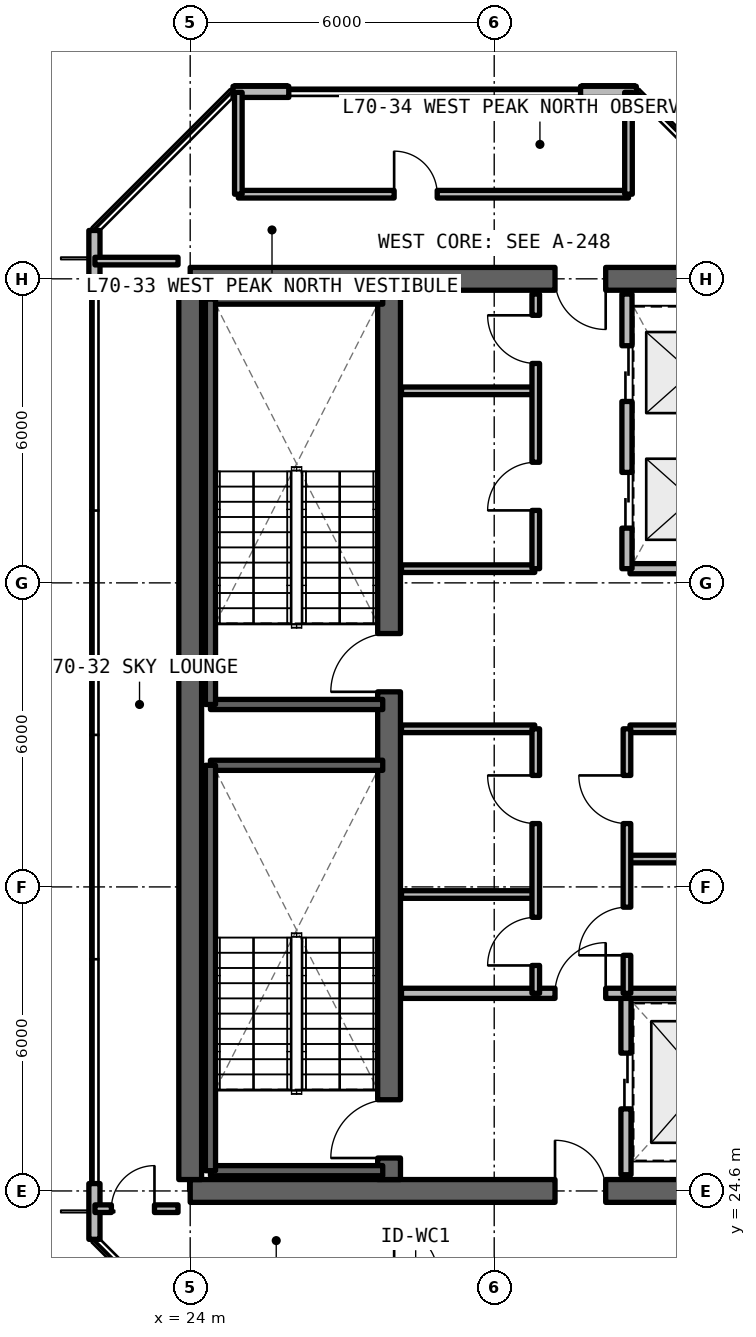
"""IFC4 building model, lengths in metres.
Left out: names, types, materials, properties, quantities, classifications, styles, units other than length and angle.
Written with IfcOpenShell. Run it as: python <this file> out.ifc"""

import sys

from ifc_helpers import new_model, si_unit, direction, frame, frame_2d, origin, place, context, subcontext, project, spatial, rectangle, extrude, element, fill, save


model = new_model("IFC4")
c1 = context("Model", 3, precision=1e-05, world=origin(), true_north=direction((0.0, 1.0)))
c2 = subcontext(c1, "Body", "Model", "MODEL_VIEW")
j1 = project(units=[si_unit("LENGTHUNIT", "METRE"), si_unit("PLANEANGLEUNIT", "RADIAN")], contexts=[c1])
p1 = place(None, origin())
s1 = spatial("IfcSite", under=j1, at=p1, CompositionType="ELEMENT")
p2 = place(p1, origin())
s2 = spatial("IfcBuilding", under=s1, at=p2, CompositionType="ELEMENT")
p3 = place(p2, frame((0.0, 0.0, 249.81)))
s3 = spatial("IfcBuildingStorey", under=s2, at=p3, CompositionType="ELEMENT", Elevation=249.81)
p4 = place(p3, frame((24.0, 24.6, 0.0), z_axis=(0.0, 0.0, 1.0), x_axis=(1.0, 0.0, 0.0)))
e1 = element("IfcWall", 1, at=p4, inside=s3, PredefinedType="SHEAR", context=c2, shape_type="SweptSolid", body=[
    extrude(rectangle(XDim=12.0, YDim=0.45, at=frame_2d((6.0, 0.0))), origin(), (0.0, 0.0, 1.0), 3.63),
])
p5 = place(p4, frame((7.2, 0.0, 0.0)))
e2 = element("IfcOpeningElement", 2, at=p5, cuts=e1, PredefinedType="OPENING", context=c2, shape_type="SweptSolid", body=[
    extrude(rectangle(XDim=1.0, YDim=2.15, at=frame_2d((0.5, 1.075))), frame((0.0, 0.235, 0.0), z_axis=(0.0, -1.0, 0.0), x_axis=(1.0, 0.0, 0.0)), (0.0, 0.0, 1.0), 0.47),
])
p6 = place(p3, frame((36.0, 42.6, 0.0), z_axis=(0.0, 0.0, 1.0), x_axis=(-1.0, 0.0, 0.0)))
e3 = element("IfcWall", 3, at=p6, inside=s3, PredefinedType="SHEAR", context=c2, shape_type="SweptSolid", body=[
    extrude(rectangle(XDim=12.0, YDim=0.45, at=frame_2d((6.0, 0.0))), origin(), (0.0, 0.0, 1.0), 3.63),
])
p7 = place(p6, frame((3.8, 0.0, 0.0)))
e4 = element("IfcOpeningElement", 4, at=p7, cuts=e3, PredefinedType="OPENING", context=c2, shape_type="SweptSolid", body=[
    extrude(rectangle(XDim=1.0, YDim=2.15, at=frame_2d((0.5, 1.075))), frame((0.0, 0.235, 0.0), z_axis=(0.0, -1.0, 0.0), x_axis=(1.0, 0.0, 0.0)), (0.0, 0.0, 1.0), 0.47),
])
p8 = place(p3, frame((24.0, 24.825, 0.0), z_axis=(0.0, 0.0, 1.0), x_axis=(0.0, 1.0, 0.0)))
e5 = element("IfcWall", 5, at=p8, inside=s3, PredefinedType="SHEAR", context=c2, shape_type="SweptSolid", body=[
    extrude(rectangle(XDim=17.55, YDim=0.45, at=frame_2d((8.775, 0.0))), origin(), (0.0, 0.0, 1.0), 3.63),
])
p9 = place(p3, frame((27.925, 24.825, 0.0), z_axis=(0.0, 0.0, 1.0), x_axis=(0.0, 1.0, 0.0)))
e6 = element("IfcWall", 6, at=p9, inside=s3, PredefinedType="SHEAR", context=c2, shape_type="SweptSolid", body=[
    extrude(rectangle(XDim=17.55, YDim=0.45, at=frame_2d((8.775, 0.0))), origin(), (0.0, 0.0, 1.0), 3.63),
])
p10 = place(p9, frame((0.425, 0.0, 0.0)))
e7 = element("IfcOpeningElement", 7, at=p10, cuts=e6, PredefinedType="OPENING", context=c2, shape_type="SweptSolid", body=[
    extrude(rectangle(XDim=1.15, YDim=2.15, at=frame_2d((0.575, 1.075))), frame((0.0, 0.235, 0.0), z_axis=(0.0, -1.0, 0.0), x_axis=(1.0, 0.0, 0.0)), (0.0, 0.0, 1.0), 0.47),
])
p11 = place(p9, frame((9.625, 0.0, 0.0)))
e8 = element("IfcOpeningElement", 8, at=p11, cuts=e6, PredefinedType="OPENING", context=c2, shape_type="SweptSolid", body=[
    extrude(rectangle(XDim=1.15, YDim=2.15, at=frame_2d((0.575, 1.075))), frame((0.0, 0.235, 0.0), z_axis=(0.0, -1.0, 0.0), x_axis=(1.0, 0.0, 0.0)), (0.0, 0.0, 1.0), 0.47),
])
p12 = place(p3, frame((32.804, 46.29, 0.0), z_axis=(0.0, 0.0, 1.0), x_axis=(-1.0, 0.0, 0.0)))
e9 = element("IfcWall", 9, at=p12, inside=s3, PredefinedType="SOLIDWALL", context=c2, shape_type="SweptSolid", body=[
    extrude(rectangle(XDim=1.1, YDim=0.22, at=frame_2d((0.55, 0.0))), origin(), (0.0, 0.0, 1.0), 3.41),
])
p13 = place(p3, frame((25.946, 46.29, 0.0), z_axis=(0.0, 0.0, 1.0), x_axis=(-1.0, 0.0, 0.0)))
e10 = element("IfcWall", 10, at=p13, inside=s3, PredefinedType="SOLIDWALL", context=c2, shape_type="SweptSolid", body=[
    extrude(rectangle(XDim=1.1, YDim=0.22, at=frame_2d((0.55, 0.0))), origin(), (0.0, 0.0, 1.0), 3.41),
])
for number, where, z_axis, x_axis in (
    (11, (22.11, 43.554, 0.0), (0.0, 0.0, 1.0), (0.0, -1.0, 0.0)),
    (12, (22.11, 24.746, 0.0), (0.0, 0.0, 1.0), (0.0, -1.0, 0.0)),
):
    element("IfcWall", number, at=place(p3, frame(where, z_axis=z_axis, x_axis=x_axis)), inside=s3, PredefinedType="SOLIDWALL", context=c2, shape_type="SweptSolid", body=[
        extrude(rectangle(XDim=1.1, YDim=0.22, at=frame_2d((0.55, 0.0))), origin(), (0.0, 0.0, 1.0), 3.41),
    ])
p14 = place(p3, frame((32.6, 24.92, 0.0), z_axis=(0.0, 0.0, 1.0), x_axis=(0.0, 1.0, 0.0)))
e13 = element("IfcWall", 13, at=p14, inside=s3, PredefinedType="SOLIDWALL", context=c2, shape_type="SweptSolid", body=[
    extrude(rectangle(XDim=3.58, YDim=0.2, at=frame_2d((1.79, 0.0))), origin(), (0.0, 0.0, 1.0), 2.63),
])
p15 = place(p14, frame((1.3, 0.0, 0.0)))
e14 = element("IfcOpeningElement", 14, at=p15, cuts=e13, PredefinedType="OPENING", context=c2, shape_type="SweptSolid", body=[
    extrude(rectangle(XDim=1.1, YDim=2.2, at=frame_2d((0.55, 1.1))), frame((0.0, 0.11, 0.0), z_axis=(0.0, -1.0, 0.0), x_axis=(1.0, 0.0, 0.0)), (0.0, 0.0, 1.0), 0.22),
])
p16 = place(p3, frame((28.17, 28.5, 0.0), z_axis=(0.0, 0.0, 1.0), x_axis=(1.0, 0.0, 0.0)))
e15 = element("IfcWall", 15, at=p16, inside=s3, PredefinedType="SOLIDWALL", context=c2, shape_type="SweptSolid", body=[
    extrude(rectangle(XDim=7.585, YDim=0.2, at=frame_2d((3.792, 0.0))), origin(), (0.0, 0.0, 1.0), 2.63),
])
p17 = place(p16, frame((3.03, 0.0, 0.0)))
e16 = element("IfcOpeningElement", 16, at=p17, cuts=e15, PredefinedType="OPENING", context=c2, shape_type="SweptSolid", body=[
    extrude(rectangle(XDim=1.0, YDim=2.15, at=frame_2d((0.5, 1.075))), frame((0.0, 0.11, 0.0), z_axis=(0.0, -1.0, 0.0), x_axis=(1.0, 0.0, 0.0)), (0.0, 0.0, 1.0), 0.22),
])
for number, where, z_axis, x_axis in (
    (17, (28.17, 30.45, 0.0), (0.0, 0.0, 1.0), (1.0, 0.0, 0.0)),
    (18, (28.17, 33.72, 0.0), (0.0, 0.0, 1.0), (1.0, 0.0, 0.0)),
):
    element("IfcWall", number, at=place(p3, frame(where, z_axis=z_axis, x_axis=x_axis)), inside=s3, PredefinedType="SOLIDWALL", context=c2, shape_type="SweptSolid", body=[
        extrude(rectangle(XDim=2.63, YDim=0.15, at=frame_2d((1.315, 0.0))), origin(), (0.0, 0.0, 1.0), 2.63),
    ])
p18 = place(p3, frame((30.82, 28.5, 0.0), z_axis=(0.0, 0.0, 1.0), x_axis=(0.0, 1.0, 0.0)))
e19 = element("IfcWall", 19, at=p18, inside=s3, PredefinedType="SOLIDWALL", context=c2, shape_type="SweptSolid", body=[
    extrude(rectangle(XDim=5.22, YDim=0.15, at=frame_2d((2.61, 0.0))), origin(), (0.0, 0.0, 1.0), 2.63),
])
p19 = place(p18, frame((0.55, 0.0, 0.0)))
e20 = element("IfcOpeningElement", 20, at=p19, cuts=e19, PredefinedType="OPENING", context=c2, shape_type="SweptSolid", body=[
    extrude(rectangle(XDim=0.95, YDim=2.15, at=frame_2d((0.475, 1.075))), frame((0.0, 0.085, 0.0), z_axis=(0.0, -1.0, 0.0), x_axis=(1.0, 0.0, 0.0)), (0.0, 0.0, 1.0), 0.17),
])
p20 = place(p18, frame((3.35, 0.0, 0.0)))
e21 = element("IfcOpeningElement", 21, at=p20, cuts=e19, PredefinedType="OPENING", context=c2, shape_type="SweptSolid", body=[
    extrude(rectangle(XDim=0.95, YDim=2.15, at=frame_2d((0.475, 1.075))), frame((0.0, 0.085, 0.0), z_axis=(0.0, -1.0, 0.0), x_axis=(1.0, 0.0, 0.0)), (0.0, 0.0, 1.0), 0.17),
])
for number, where, z_axis, x_axis in (
    (22, (32.68, 31.15, 0.0), (0.0, 0.0, 1.0), (1.0, 0.0, 0.0)),
    (23, (32.68, 33.72, 0.0), (0.0, 0.0, 1.0), (1.0, 0.0, 0.0)),
):
    element("IfcWall", number, at=place(p3, frame(where, z_axis=z_axis, x_axis=x_axis)), inside=s3, PredefinedType="SOLIDWALL", context=c2, shape_type="SweptSolid", body=[
        extrude(rectangle(XDim=3.075, YDim=0.15, at=frame_2d((1.538, 0.0))), origin(), (0.0, 0.0, 1.0), 2.63),
    ])
p21 = place(p3, frame((32.62, 28.5, 0.0), z_axis=(0.0, 0.0, 1.0), x_axis=(0.0, 1.0, 0.0)))
e24 = element("IfcWall", 24, at=p21, inside=s3, PredefinedType="SOLIDWALL", context=c2, shape_type="SweptSolid", body=[
    extrude(rectangle(XDim=5.22, YDim=0.15, at=frame_2d((2.61, 0.0))), origin(), (0.0, 0.0, 1.0), 2.63),
])
p22 = place(p21, frame((0.75, 0.0, 0.0)))
e25 = element("IfcOpeningElement", 25, at=p22, cuts=e24, PredefinedType="OPENING", context=c2, shape_type="SweptSolid", body=[
    extrude(rectangle(XDim=0.95, YDim=2.15, at=frame_2d((0.475, 1.075))), frame((0.0, 0.085, 0.0), z_axis=(0.0, -1.0, 0.0), x_axis=(1.0, 0.0, 0.0)), (0.0, 0.0, 1.0), 0.17),
])
p23 = place(p21, frame((3.35, 0.0, 0.0)))
e26 = element("IfcOpeningElement", 26, at=p23, cuts=e24, PredefinedType="OPENING", context=c2, shape_type="SweptSolid", body=[
    extrude(rectangle(XDim=0.95, YDim=2.15, at=frame_2d((0.475, 1.075))), frame((0.0, 0.085, 0.0), z_axis=(0.0, -1.0, 0.0), x_axis=(1.0, 0.0, 0.0)), (0.0, 0.0, 1.0), 0.17),
])
for number, where, z_axis, x_axis in (
    (27, (28.17, 36.88, 0.0), (0.0, 0.0, 1.0), (1.0, 0.0, 0.0)),
    (28, (28.17, 40.39, 0.0), (0.0, 0.0, 1.0), (1.0, 0.0, 0.0)),
):
    element("IfcWall", number, at=place(p3, frame(where, z_axis=z_axis, x_axis=x_axis)), inside=s3, PredefinedType="SOLIDWALL", context=c2, shape_type="SweptSolid", body=[
        extrude(rectangle(XDim=2.63, YDim=0.15, at=frame_2d((1.315, 0.0))), origin(), (0.0, 0.0, 1.0), 2.63),
    ])
p24 = place(p3, frame((30.82, 36.88, 0.0), z_axis=(0.0, 0.0, 1.0), x_axis=(0.0, 1.0, 0.0)))
e29 = element("IfcWall", 29, at=p24, inside=s3, PredefinedType="SOLIDWALL", context=c2, shape_type="SweptSolid", body=[
    extrude(rectangle(XDim=5.42, YDim=0.15, at=frame_2d((2.71, 0.0))), origin(), (0.0, 0.0, 1.0), 2.63),
])
p25 = place(p24, frame((1.15, 0.0, 0.0)))
e30 = element("IfcOpeningElement", 30, at=p25, cuts=e29, PredefinedType="OPENING", context=c2, shape_type="SweptSolid", body=[
    extrude(rectangle(XDim=0.95, YDim=2.15, at=frame_2d((0.475, 1.075))), frame((0.0, 0.085, 0.0), z_axis=(0.0, -1.0, 0.0), x_axis=(1.0, 0.0, 0.0)), (0.0, 0.0, 1.0), 0.17),
])
p26 = place(p24, frame((4.05, 0.0, 0.0)))
e31 = element("IfcOpeningElement", 31, at=p26, cuts=e29, PredefinedType="OPENING", context=c2, shape_type="SweptSolid", body=[
    extrude(rectangle(XDim=0.95, YDim=2.15, at=frame_2d((0.475, 1.075))), frame((0.0, 0.085, 0.0), z_axis=(0.0, -1.0, 0.0), x_axis=(1.0, 0.0, 0.0)), (0.0, 0.0, 1.0), 0.17),
])
p27 = place(p3, frame((32.68, 36.88, 0.0), z_axis=(0.0, 0.0, 1.0), x_axis=(1.0, 0.0, 0.0)))
e32 = element("IfcWall", 32, at=p27, inside=s3, PredefinedType="SOLIDWALL", context=c2, shape_type="SweptSolid", body=[
    extrude(rectangle(XDim=3.075, YDim=0.2, at=frame_2d((1.538, 0.0))), origin(), (0.0, 0.0, 1.0), 2.63),
])
p28 = place(p3, frame((32.62, 36.88, 0.0), z_axis=(0.0, 0.0, 1.0), x_axis=(0.0, 1.0, 0.0)))
e33 = element("IfcWall", 33, at=p28, inside=s3, PredefinedType="SOLIDWALL", context=c2, shape_type="SweptSolid", body=[
    extrude(rectangle(XDim=5.42, YDim=0.2, at=frame_2d((2.71, 0.0))), origin(), (0.0, 0.0, 1.0), 2.63),
])
p29 = place(p28, frame((0.8, 0.0, 0.0)))
e34 = element("IfcOpeningElement", 34, at=p29, cuts=e33, PredefinedType="OPENING", context=c2, shape_type="SweptSolid", body=[
    extrude(rectangle(XDim=1.1, YDim=2.2, at=frame_2d((0.55, 1.1))), frame((0.0, 0.11, 0.0), z_axis=(0.0, -1.0, 0.0), x_axis=(1.0, 0.0, 0.0)), (0.0, 0.0, 1.0), 0.22),
])
p30 = place(p28, frame((3.3, 0.0, 0.0)))
e35 = element("IfcOpeningElement", 35, at=p30, cuts=e33, PredefinedType="OPENING", context=c2, shape_type="SweptSolid", body=[
    extrude(rectangle(XDim=1.1, YDim=2.2, at=frame_2d((0.55, 1.1))), frame((0.0, 0.11, 0.0), z_axis=(0.0, -1.0, 0.0), x_axis=(1.0, 0.0, 0.0)), (0.0, 0.0, 1.0), 0.22),
])
p31 = place(p3, frame((22.12, 24.25, 0.0), z_axis=(0.0, 0.0, 1.0), x_axis=(1.0, 0.0, 0.0)))
e36 = element("IfcWall", 36, at=p31, inside=s3, PredefinedType="SOLIDWALL", context=c2, shape_type="SweptSolid", body=[
    extrude(rectangle(XDim=1.64, YDim=0.15, at=frame_2d((0.82, 0.0))), origin(), (0.0, 0.0, 1.0), 2.63),
])
p32 = place(p31, frame((0.325, 0.0, 0.0)))
e37 = element("IfcOpeningElement", 37, at=p32, cuts=e36, PredefinedType="OPENING", context=c2, shape_type="SweptSolid", body=[
    extrude(rectangle(XDim=0.85, YDim=2.1, at=frame_2d((0.425, 1.05))), frame((0.0, 0.085, 0.0), z_axis=(0.0, -1.0, 0.0), x_axis=(1.0, 0.0, 0.0)), (0.0, 0.0, 1.0), 0.17),
])
p33 = place(p3, frame((22.12, 42.95, 0.0), z_axis=(0.0, 0.0, 1.0), x_axis=(1.0, 0.0, 0.0)))
e38 = element("IfcWall", 38, at=p33, inside=s3, PredefinedType="SOLIDWALL", context=c2, shape_type="SweptSolid", body=[
    extrude(rectangle(XDim=1.64, YDim=0.15, at=frame_2d((0.82, 0.0))), origin(), (0.0, 0.0, 1.0), 2.63),
])
p34 = place(p3, frame((24.95, 44.27, 0.0), z_axis=(0.0, 0.0, 1.0), x_axis=(1.0, 0.0, 0.0)))
e39 = element("IfcWall", 39, at=p34, inside=s3, PredefinedType="SOLIDWALL", context=c2, shape_type="SweptSolid", body=[
    extrude(rectangle(XDim=7.7, YDim=0.15, at=frame_2d((3.85, 0.0))), origin(), (0.0, 0.0, 1.0), 2.63),
])
p35 = place(p34, frame((3.075, 0.0, 0.0)))
e40 = element("IfcOpeningElement", 40, at=p35, cuts=e39, PredefinedType="OPENING", context=c2, shape_type="SweptSolid", body=[
    extrude(rectangle(XDim=0.85, YDim=2.1, at=frame_2d((0.425, 1.05))), frame((0.0, 0.085, 0.0), z_axis=(0.0, -1.0, 0.0), x_axis=(1.0, 0.0, 0.0)), (0.0, 0.0, 1.0), 0.17),
])
for number, where, z_axis, x_axis in (
    (41, (24.95, 44.27, 0.0), (0.0, 0.0, 1.0), (0.0, 1.0, 0.0)),
    (42, (32.65, 44.27, 0.0), (0.0, 0.0, 1.0), (0.0, 1.0, 0.0)),
):
    element("IfcWall", number, at=place(p3, frame(where, z_axis=z_axis, x_axis=x_axis)), inside=s3, PredefinedType="SOLIDWALL", context=c2, shape_type="SweptSolid", body=[
        extrude(rectangle(XDim=2.01, YDim=0.15, at=frame_2d((1.005, 0.0))), origin(), (0.0, 0.0, 1.0), 2.63),
    ])
for number, where, z_axis, x_axis in (
    (43, (24.4, 25.0, 0.0), (0.0, 0.0, 1.0), (1.0, 0.0, 0.0)),
    (44, (27.8, 33.0, 0.0), (0.0, 0.0, 1.0), (-1.0, 0.0, 0.0)),
):
    element("IfcWall", number, at=place(p3, frame(where, z_axis=z_axis, x_axis=x_axis)), inside=s3, PredefinedType="SOLIDWALL", context=c2, shape_type="SweptSolid", body=[
        extrude(rectangle(XDim=3.4, YDim=0.2, at=frame_2d((1.7, 0.0))), origin(), (0.0, 0.0, 1.0), 3.63),
    ])
p36 = place(p3, frame((24.4, 33.0, 0.0), z_axis=(0.0, 0.0, 1.0), x_axis=(0.0, -1.0, 0.0)))
e45 = element("IfcWall", 45, at=p36, inside=s3, PredefinedType="SOLIDWALL", context=c2, shape_type="SweptSolid", body=[
    extrude(rectangle(XDim=8.0, YDim=0.2, at=frame_2d((4.0, 0.0))), origin(), (0.0, 0.0, 1.0), 3.63),
])
for number, where, z_axis, x_axis in (
    (46, (24.4, 34.2, 0.0), (0.0, 0.0, 1.0), (1.0, 0.0, 0.0)),
    (47, (27.8, 42.2, 0.0), (0.0, 0.0, 1.0), (-1.0, 0.0, 0.0)),
):
    element("IfcWall", number, at=place(p3, frame(where, z_axis=z_axis, x_axis=x_axis)), inside=s3, PredefinedType="SOLIDWALL", context=c2, shape_type="SweptSolid", body=[
        extrude(rectangle(XDim=3.4, YDim=0.2, at=frame_2d((1.7, 0.0))), origin(), (0.0, 0.0, 1.0), 3.63),
    ])
p37 = place(p3, frame((24.4, 42.2, 0.0), z_axis=(0.0, 0.0, 1.0), x_axis=(0.0, -1.0, 0.0)))
e48 = element("IfcWall", 48, at=p37, inside=s3, PredefinedType="SOLIDWALL", context=c2, shape_type="SweptSolid", body=[
    extrude(rectangle(XDim=8.0, YDim=0.2, at=frame_2d((4.0, 0.0))), origin(), (0.0, 0.0, 1.0), 3.63),
])
p38 = place(p15, origin())
e49 = element("IfcDoor", 49, at=p38, inside=s3, OperationType="SLIDING_TO_LEFT", PredefinedType="DOOR", context=c2, shape_type="SweptSolid", body=[
    extrude(rectangle(XDim=1.1, YDim=2.2, at=frame_2d((0.55, 1.1))), frame((0.0, 0.025, 0.0), z_axis=(0.0, -1.0, 0.0), x_axis=(1.0, 0.0, 0.0)), (0.0, 0.0, 1.0), 0.05),
])
fill(e14, e49)
p39 = place(p17, origin())
e50 = element("IfcDoor", 50, at=p39, inside=s3, OperationType="SINGLE_SWING_RIGHT", PredefinedType="DOOR", context=c2, shape_type="SweptSolid", body=[
    extrude(rectangle(XDim=1.0, YDim=2.15, at=frame_2d((0.5, 1.075))), frame((0.0, 0.025, 0.0), z_axis=(0.0, -1.0, 0.0), x_axis=(1.0, 0.0, 0.0)), (0.0, 0.0, 1.0), 0.05),
])
fill(e16, e50)
p40 = place(p19, origin())
e51 = element("IfcDoor", 51, at=p40, inside=s3, OperationType="SINGLE_SWING_LEFT", PredefinedType="DOOR", context=c2, shape_type="SweptSolid", body=[
    extrude(rectangle(XDim=0.95, YDim=2.15, at=frame_2d((0.475, 1.075))), frame((0.0, 0.025, 0.0), z_axis=(0.0, -1.0, 0.0), x_axis=(1.0, 0.0, 0.0)), (0.0, 0.0, 1.0), 0.05),
])
fill(e20, e51)
p41 = place(p20, origin())
e52 = element("IfcDoor", 52, at=p41, inside=s3, OperationType="SINGLE_SWING_RIGHT", PredefinedType="DOOR", context=c2, shape_type="SweptSolid", body=[
    extrude(rectangle(XDim=0.95, YDim=2.15, at=frame_2d((0.475, 1.075))), frame((0.0, 0.025, 0.0), z_axis=(0.0, -1.0, 0.0), x_axis=(1.0, 0.0, 0.0)), (0.0, 0.0, 1.0), 0.05),
])
fill(e21, e52)
p42 = place(p22, origin())
e53 = element("IfcDoor", 53, at=p42, inside=s3, OperationType="SINGLE_SWING_LEFT", PredefinedType="DOOR", context=c2, shape_type="SweptSolid", body=[
    extrude(rectangle(XDim=0.95, YDim=2.15, at=frame_2d((0.475, 1.075))), frame((0.0, 0.025, 0.0), z_axis=(0.0, -1.0, 0.0), x_axis=(1.0, 0.0, 0.0)), (0.0, 0.0, 1.0), 0.05),
])
fill(e25, e53)
p43 = place(p23, origin())
e54 = element("IfcDoor", 54, at=p43, inside=s3, OperationType="SINGLE_SWING_RIGHT", PredefinedType="DOOR", context=c2, shape_type="SweptSolid", body=[
    extrude(rectangle(XDim=0.95, YDim=2.15, at=frame_2d((0.475, 1.075))), frame((0.0, 0.025, 0.0), z_axis=(0.0, -1.0, 0.0), x_axis=(1.0, 0.0, 0.0)), (0.0, 0.0, 1.0), 0.05),
])
fill(e26, e54)
p44 = place(p25, origin())
e55 = element("IfcDoor", 55, at=p44, inside=s3, OperationType="SINGLE_SWING_LEFT", PredefinedType="DOOR", context=c2, shape_type="SweptSolid", body=[
    extrude(rectangle(XDim=0.95, YDim=2.15, at=frame_2d((0.475, 1.075))), frame((0.0, 0.025, 0.0), z_axis=(0.0, -1.0, 0.0), x_axis=(1.0, 0.0, 0.0)), (0.0, 0.0, 1.0), 0.05),
])
fill(e30, e55)
p45 = place(p26, origin())
e56 = element("IfcDoor", 56, at=p45, inside=s3, OperationType="SINGLE_SWING_RIGHT", PredefinedType="DOOR", context=c2, shape_type="SweptSolid", body=[
    extrude(rectangle(XDim=0.95, YDim=2.15, at=frame_2d((0.475, 1.075))), frame((0.0, 0.025, 0.0), z_axis=(0.0, -1.0, 0.0), x_axis=(1.0, 0.0, 0.0)), (0.0, 0.0, 1.0), 0.05),
])
fill(e31, e56)
p46 = place(p29, origin())
e57 = element("IfcDoor", 57, at=p46, inside=s3, OperationType="SLIDING_TO_LEFT", PredefinedType="DOOR", context=c2, shape_type="SweptSolid", body=[
    extrude(rectangle(XDim=1.1, YDim=2.2, at=frame_2d((0.55, 1.1))), frame((0.0, 0.025, 0.0), z_axis=(0.0, -1.0, 0.0), x_axis=(1.0, 0.0, 0.0)), (0.0, 0.0, 1.0), 0.05),
])
fill(e34, e57)
p47 = place(p30, origin())
e58 = element("IfcDoor", 58, at=p47, inside=s3, OperationType="SLIDING_TO_RIGHT", PredefinedType="DOOR", context=c2, shape_type="SweptSolid", body=[
    extrude(rectangle(XDim=1.1, YDim=2.2, at=frame_2d((0.55, 1.1))), frame((0.0, 0.025, 0.0), z_axis=(0.0, -1.0, 0.0), x_axis=(1.0, 0.0, 0.0)), (0.0, 0.0, 1.0), 0.05),
])
fill(e35, e58)
p48 = place(p32, origin())
e59 = element("IfcDoor", 59, at=p48, inside=s3, OperationType="SINGLE_SWING_RIGHT", PredefinedType="DOOR", context=c2, shape_type="SweptSolid", body=[
    extrude(rectangle(XDim=0.85, YDim=2.1, at=frame_2d((0.425, 1.05))), frame((0.0, 0.025, 0.0), z_axis=(0.0, -1.0, 0.0), x_axis=(1.0, 0.0, 0.0)), (0.0, 0.0, 1.0), 0.05),
])
fill(e37, e59)
p49 = place(p35, origin())
e60 = element("IfcDoor", 60, at=p49, inside=s3, OperationType="SINGLE_SWING_LEFT", PredefinedType="DOOR", context=c2, shape_type="SweptSolid", body=[
    extrude(rectangle(XDim=0.85, YDim=2.1, at=frame_2d((0.425, 1.05))), frame((0.0, 0.025, 0.0), z_axis=(0.0, -1.0, 0.0), x_axis=(1.0, 0.0, 0.0)), (0.0, 0.0, 1.0), 0.05),
])
fill(e40, e60)
p50 = place(p10, origin())
e61 = element("IfcDoor", 61, at=p50, inside=s3, OperationType="SINGLE_SWING_LEFT", PredefinedType="DOOR", context=c2, shape_type="SweptSolid", body=[
    extrude(rectangle(XDim=1.15, YDim=2.15, at=frame_2d((0.575, 1.075))), frame((0.0, 0.025, 0.0), z_axis=(0.0, -1.0, 0.0), x_axis=(1.0, 0.0, 0.0)), (0.0, 0.0, 1.0), 0.05),
])
fill(e7, e61)
p51 = place(p11, origin())
e62 = element("IfcDoor", 62, at=p51, inside=s3, OperationType="SINGLE_SWING_RIGHT", PredefinedType="DOOR", context=c2, shape_type="SweptSolid", body=[
    extrude(rectangle(XDim=1.15, YDim=2.15, at=frame_2d((0.575, 1.075))), frame((0.0, 0.025, 0.0), z_axis=(0.0, -1.0, 0.0), x_axis=(1.0, 0.0, 0.0)), (0.0, 0.0, 1.0), 0.05),
])
fill(e8, e62)
p52 = place(p5, origin())
e63 = element("IfcDoor", 63, at=p52, inside=s3, OperationType="SINGLE_SWING_LEFT", PredefinedType="DOOR", context=c2, shape_type="SweptSolid", body=[
    extrude(rectangle(XDim=1.0, YDim=2.15, at=frame_2d((0.5, 1.075))), frame((0.0, 0.025, 0.0), z_axis=(0.0, -1.0, 0.0), x_axis=(1.0, 0.0, 0.0)), (0.0, 0.0, 1.0), 0.05),
])
fill(e2, e63)
p53 = place(p7, origin())
e64 = element("IfcDoor", 64, at=p53, inside=s3, OperationType="SINGLE_SWING_RIGHT", PredefinedType="DOOR", context=c2, shape_type="SweptSolid", body=[
    extrude(rectangle(XDim=1.0, YDim=2.15, at=frame_2d((0.5, 1.075))), frame((0.0, 0.025, 0.0), z_axis=(0.0, -1.0, 0.0), x_axis=(1.0, 0.0, 0.0)), (0.0, 0.0, 1.0), 0.05),
])
fill(e4, e64)
save(model, sys.argv[1])
